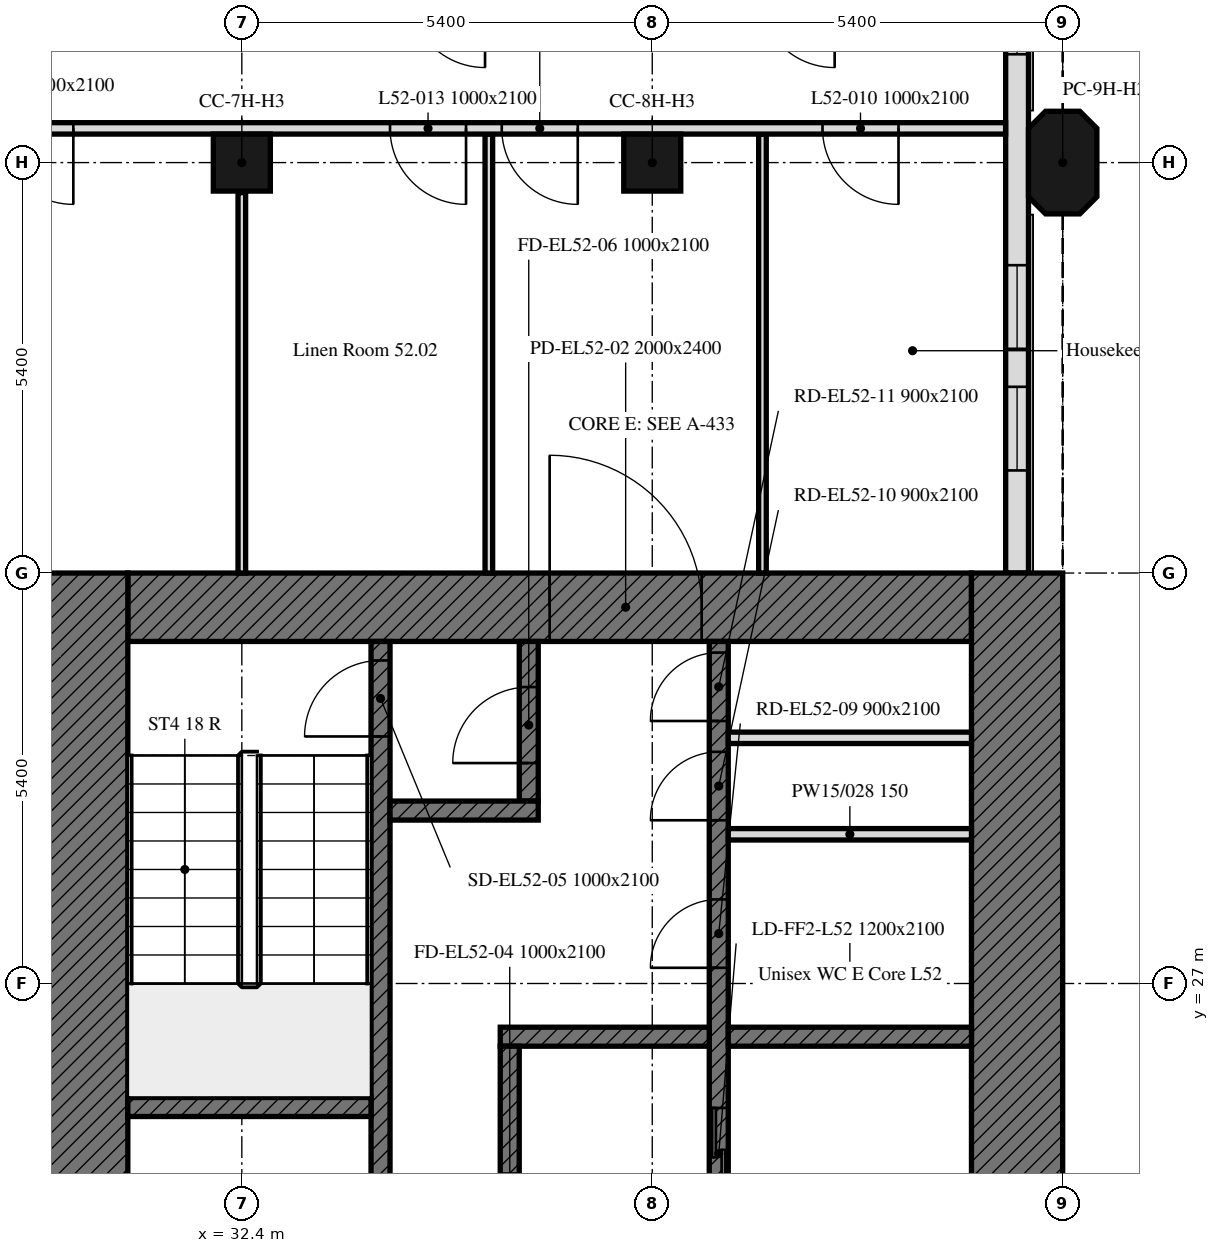
"""IFC4 building model, lengths in metres.
Left out: names, types, materials, properties, quantities, classifications, styles, units other than length and angle.
Written with IfcOpenShell. Run it as: python <this file> out.ifc"""

import sys

from ifc_helpers import new_model, si_unit, direction, frame, frame_2d, origin, origin_2d, place, context, subcontext, project, spatial, polyline, rectangle, outline, extrude, element, fill, save


model = new_model("IFC4")
c1 = context("Model", 3, precision=1e-05, world=origin(), true_north=direction((0.0, 1.0)))
c2 = subcontext(c1, "Body", "Model", "MODEL_VIEW")
j1 = project(units=[si_unit("LENGTHUNIT", "METRE"), si_unit("PLANEANGLEUNIT", "RADIAN")], contexts=[c1])
p1 = place(None, origin())
s1 = spatial("IfcSite", under=j1, at=p1, CompositionType="ELEMENT")
p2 = place(p1, origin())
s2 = spatial("IfcBuilding", under=s1, at=p2, CompositionType="ELEMENT")
p3 = place(p2, frame((0.0, 0.0, 210.4)))
s3 = spatial("IfcBuildingStorey", under=s2, at=p3, CompositionType="ELEMENT", Elevation=210.4)
for number, where, z_axis, x_axis in (
    (1, (32.4, 37.8, 0.0), (0.0, 0.0, 1.0), (1.0, 0.0, 0.0)),
    (2, (37.8, 37.8, 0.0), (0.0, 0.0, 1.0), (1.0, 0.0, 0.0)),
):
    element("IfcColumn", number, at=place(p3, frame(where, z_axis=z_axis, x_axis=x_axis)), inside=s3, PredefinedType="COLUMN", context=c2, shape_type="SweptSolid", body=[
        extrude(rectangle(XDim=0.75, YDim=0.75, at=origin_2d()), origin(), (0.0, 0.0, 1.0), 3.0),
    ])
p4 = place(p3, frame((43.2, 37.8, 0.0), z_axis=(0.0, 0.0, 1.0), x_axis=(0.0, 1.0, 0.0)))
e3 = element("IfcColumn", 3, at=p4, inside=s3, PredefinedType="COLUMN", context=c2, shape_type="SweptSolid", body=[
    extrude(outline(polyline([(-0.45, -0.45), (0.45, -0.45), (0.675, -0.225), (0.675, 0.225), (0.45, 0.45), (-0.45, 0.45), (-0.675, 0.225), (-0.675, -0.225), (-0.45, -0.45)])), origin(), (0.0, 0.0, 1.0), 3.0),
])
p5 = place(p3, frame((42.6, 32.4, 0.0), z_axis=(0.0, 0.0, 1.0), x_axis=(0.0, 1.0, 0.0)))
e4 = element("IfcWall", 4, at=p5, inside=s3, PredefinedType="SOLIDWALL", context=c2, shape_type="SweptSolid", body=[
    extrude(rectangle(XDim=10.614, YDim=0.3, at=frame_2d((5.307, 0.0))), origin(), (0.0, 0.0, 1.0), 3.0),
])
p6 = place(p5, frame((1.35, 0.0, 0.9)))
e5 = element("IfcOpeningElement", 5, at=p6, cuts=e4, PredefinedType="OPENING", context=c2, shape_type="SweptSolid", body=[
    extrude(rectangle(XDim=1.1, YDim=1.7, at=frame_2d((0.55, 0.85))), frame((0.0, 0.16, 0.0), z_axis=(0.0, -1.0, 0.0), x_axis=(1.0, 0.0, 0.0)), (0.0, 0.0, 1.0), 0.32),
])
p7 = place(p5, frame((2.95, 0.0, 0.9)))
e6 = element("IfcOpeningElement", 6, at=p7, cuts=e4, PredefinedType="OPENING", context=c2, shape_type="SweptSolid", body=[
    extrude(rectangle(XDim=1.1, YDim=1.7, at=frame_2d((0.55, 0.85))), frame((0.0, 0.16, 0.0), z_axis=(0.0, -1.0, 0.0), x_axis=(1.0, 0.0, 0.0)), (0.0, 0.0, 1.0), 0.32),
])
p8 = place(p5, frame((6.825, 0.0, 0.9)))
e7 = element("IfcOpeningElement", 7, at=p8, cuts=e4, PredefinedType="OPENING", context=c2, shape_type="SweptSolid", body=[
    extrude(rectangle(XDim=0.65, YDim=1.7, at=frame_2d((0.325, 0.85))), frame((0.0, 0.16, 0.0), z_axis=(0.0, -1.0, 0.0), x_axis=(1.0, 0.0, 0.0)), (0.0, 0.0, 1.0), 0.32),
])
p9 = place(p5, frame((8.35, 0.0, 0.9)))
e8 = element("IfcOpeningElement", 8, at=p9, cuts=e4, PredefinedType="OPENING", context=c2, shape_type="SweptSolid", body=[
    extrude(rectangle(XDim=1.1, YDim=1.7, at=frame_2d((0.55, 0.85))), frame((0.0, 0.16, 0.0), z_axis=(0.0, -1.0, 0.0), x_axis=(1.0, 0.0, 0.0)), (0.0, 0.0, 1.0), 0.32),
])
p10 = place(p3, frame((30.9, 31.95, 0.0), z_axis=(0.0, 0.0, 1.0), x_axis=(1.0, 0.0, 0.0)))
e9 = element("IfcWall", 9, at=p10, inside=s3, PredefinedType="SOLIDWALL", context=c2, shape_type="SweptSolid", body=[
    extrude(rectangle(XDim=11.1, YDim=0.9, at=frame_2d((5.55, 0.0))), origin(), (0.0, 0.0, 1.0), 3.0),
])
p11 = place(p10, frame((5.55, 0.0, 0.0)))
e10 = element("IfcOpeningElement", 10, at=p11, cuts=e9, PredefinedType="OPENING", context=c2, shape_type="SweptSolid", body=[
    extrude(rectangle(XDim=2.0, YDim=2.4, at=frame_2d((1.0, 1.2))), frame((0.0, 0.45, 0.0), z_axis=(0.0, -1.0, 0.0), x_axis=(1.0, 0.0, 0.0)), (0.0, 0.0, 1.0), 0.9),
])
for number, where, z_axis, x_axis in (
    (11, (42.6, 32.4, 0.0), (0.0, 0.0, 1.0), (0.0, -1.0, 0.0)),
    (12, (30.3, 16.2, 0.0), (0.0, 0.0, 1.0), (0.0, 1.0, 0.0)),
):
    element("IfcWall", number, at=place(p3, frame(where, z_axis=z_axis, x_axis=x_axis)), inside=s3, PredefinedType="SOLIDWALL", context=c2, shape_type="SweptSolid", body=[
        extrude(rectangle(XDim=16.2, YDim=1.2, at=frame_2d((8.1, 0.0))), origin(), (0.0, 0.0, 1.0), 3.0),
    ])
p12 = place(p3, frame((38.675, 17.1, 0.0), z_axis=(0.0, 0.0, 1.0), x_axis=(0.0, 1.0, 0.0)))
e13 = element("IfcWall", 13, at=p12, inside=s3, PredefinedType="SOLIDWALL", context=c2, shape_type="SweptSolid", body=[
    extrude(rectangle(XDim=14.4, YDim=0.25, at=frame_2d((7.2, 0.0))), origin(), (0.0, 0.0, 1.0), 3.0),
])
p13 = place(p12, frame((4.6, 0.0, 0.0)))
e14 = element("IfcOpeningElement", 14, at=p13, cuts=e13, PredefinedType="OPENING", context=c2, shape_type="SweptSolid", body=[
    extrude(rectangle(XDim=1.0, YDim=2.1, at=frame_2d((0.5, 1.05))), frame((0.0, 0.125, 0.0), z_axis=(0.0, -1.0, 0.0), x_axis=(1.0, 0.0, 0.0)), (0.0, 0.0, 1.0), 0.25),
])
p14 = place(p12, frame((7.062, 0.0, 0.0)))
e15 = element("IfcOpeningElement", 15, at=p14, cuts=e13, PredefinedType="OPENING", context=c2, shape_type="SweptSolid", body=[
    extrude(rectangle(XDim=1.2, YDim=2.1, at=frame_2d((0.6, 1.05))), frame((0.0, 0.125, 0.0), z_axis=(0.0, -1.0, 0.0), x_axis=(1.0, 0.0, 0.0)), (0.0, 0.0, 1.0), 0.25),
])
p15 = place(p12, frame((10.106, 0.0, 0.0)))
e16 = element("IfcOpeningElement", 16, at=p15, cuts=e13, PredefinedType="OPENING", context=c2, shape_type="SweptSolid", body=[
    extrude(rectangle(XDim=0.9, YDim=2.1, at=frame_2d((0.45, 1.05))), frame((0.0, 0.125, 0.0), z_axis=(0.0, -1.0, 0.0), x_axis=(1.0, 0.0, 0.0)), (0.0, 0.0, 1.0), 0.25),
])
p16 = place(p12, frame((12.048, 0.0, 0.0)))
e17 = element("IfcOpeningElement", 17, at=p16, cuts=e13, PredefinedType="OPENING", context=c2, shape_type="SweptSolid", body=[
    extrude(rectangle(XDim=0.9, YDim=2.1, at=frame_2d((0.45, 1.05))), frame((0.0, 0.125, 0.0), z_axis=(0.0, -1.0, 0.0), x_axis=(1.0, 0.0, 0.0)), (0.0, 0.0, 1.0), 0.25),
])
p17 = place(p12, frame((13.354, 0.0, 0.0)))
e18 = element("IfcOpeningElement", 18, at=p17, cuts=e13, PredefinedType="OPENING", context=c2, shape_type="SweptSolid", body=[
    extrude(rectangle(XDim=0.9, YDim=2.1, at=frame_2d((0.45, 1.05))), frame((0.0, 0.125, 0.0), z_axis=(0.0, -1.0, 0.0), x_axis=(1.0, 0.0, 0.0)), (0.0, 0.0, 1.0), 0.25),
])
p18 = place(p3, frame((34.225, 17.1, 0.0), z_axis=(0.0, 0.0, 1.0), x_axis=(0.0, 1.0, 0.0)))
e19 = element("IfcWall", 19, at=p18, inside=s3, PredefinedType="SOLIDWALL", context=c2, shape_type="SweptSolid", body=[
    extrude(rectangle(XDim=14.4, YDim=0.25, at=frame_2d((7.2, 0.0))), origin(), (0.0, 0.0, 1.0), 3.0),
])
p19 = place(p18, frame((13.15, 0.0, 0.0)))
e20 = element("IfcOpeningElement", 20, at=p19, cuts=e19, PredefinedType="OPENING", context=c2, shape_type="SweptSolid", body=[
    extrude(rectangle(XDim=1.0, YDim=2.1, at=frame_2d((0.5, 1.05))), frame((0.0, 0.125, 0.0), z_axis=(0.0, -1.0, 0.0), x_axis=(1.0, 0.0, 0.0)), (0.0, 0.0, 1.0), 0.25),
])
p20 = place(p18, frame((0.6, 0.0, 0.0)))
e21 = element("IfcOpeningElement", 21, at=p20, cuts=e19, PredefinedType="OPENING", context=c2, shape_type="SweptSolid", body=[
    extrude(rectangle(XDim=1.1, YDim=2.1, at=frame_2d((0.55, 1.05))), frame((0.0, 0.125, 0.0), z_axis=(0.0, -1.0, 0.0), x_axis=(1.0, 0.0, 0.0)), (0.0, 0.0, 1.0), 0.25),
])
p21 = place(p18, frame((3.25, 0.0, 0.0)))
e22 = element("IfcOpeningElement", 22, at=p21, cuts=e19, PredefinedType="OPENING", context=c2, shape_type="SweptSolid", body=[
    extrude(rectangle(XDim=0.9, YDim=2.1, at=frame_2d((0.45, 1.05))), frame((0.0, 0.125, 0.0), z_axis=(0.0, -1.0, 0.0), x_axis=(1.0, 0.0, 0.0)), (0.0, 0.0, 1.0), 0.25),
])
p22 = place(p3, frame((30.9, 25.375, 0.0), z_axis=(0.0, 0.0, 1.0), x_axis=(1.0, 0.0, 0.0)))
e23 = element("IfcWall", 23, at=p22, inside=s3, PredefinedType="SOLIDWALL", context=c2, shape_type="SweptSolid", body=[
    extrude(rectangle(XDim=3.2, YDim=0.25, at=frame_2d((1.6, 0.0))), origin(), (0.0, 0.0, 1.0), 3.0),
])
p23 = place(p3, frame((38.8, 26.3, 0.0), z_axis=(0.0, 0.0, 1.0), x_axis=(1.0, 0.0, 0.0)))
e24 = element("IfcWall", 24, at=p23, inside=s3, PredefinedType="SOLIDWALL", context=c2, shape_type="SweptSolid", body=[
    extrude(rectangle(XDim=3.2, YDim=0.25, at=frame_2d((1.6, 0.0))), origin(), (0.0, 0.0, 1.0), 3.0),
])
p24 = place(p3, frame((35.8, 26.3, 0.0), z_axis=(0.0, 0.0, 1.0), x_axis=(1.0, 0.0, 0.0)))
e25 = element("IfcWall", 25, at=p24, inside=s3, PredefinedType="SOLIDWALL", context=c2, shape_type="SweptSolid", body=[
    extrude(rectangle(XDim=2.75, YDim=0.25, at=frame_2d((1.375, 0.0))), origin(), (0.0, 0.0, 1.0), 3.0),
])
p25 = place(p3, frame((36.175, 29.4, 0.0), z_axis=(0.0, 0.0, 1.0), x_axis=(0.0, 1.0, 0.0)))
e26 = element("IfcWall", 26, at=p25, inside=s3, PredefinedType="SOLIDWALL", context=c2, shape_type="SweptSolid", body=[
    extrude(rectangle(XDim=2.1, YDim=0.25, at=frame_2d((1.05, 0.0))), origin(), (0.0, 0.0, 1.0), 3.0),
])
p26 = place(p25, frame((0.5, 0.0, 0.0)))
e27 = element("IfcOpeningElement", 27, at=p26, cuts=e26, PredefinedType="OPENING", context=c2, shape_type="SweptSolid", body=[
    extrude(rectangle(XDim=1.0, YDim=2.1, at=frame_2d((0.5, 1.05))), frame((0.0, 0.125, 0.0), z_axis=(0.0, -1.0, 0.0), x_axis=(1.0, 0.0, 0.0)), (0.0, 0.0, 1.0), 0.25),
])
p27 = place(p3, frame((34.35, 29.275, 0.0), z_axis=(0.0, 0.0, 1.0), x_axis=(1.0, 0.0, 0.0)))
e28 = element("IfcWall", 28, at=p27, inside=s3, PredefinedType="SOLIDWALL", context=c2, shape_type="SweptSolid", body=[
    extrude(rectangle(XDim=1.95, YDim=0.25, at=frame_2d((0.975, 0.0))), origin(), (0.0, 0.0, 1.0), 3.0),
])
p28 = place(p3, frame((35.925, 20.55, 0.0), z_axis=(0.0, 0.0, 1.0), x_axis=(0.0, 1.0, 0.0)))
e29 = element("IfcWall", 29, at=p28, inside=s3, PredefinedType="SOLIDWALL", context=c2, shape_type="SweptSolid", body=[
    extrude(rectangle(XDim=5.625, YDim=0.25, at=frame_2d((2.812, 0.0))), origin(), (0.0, 0.0, 1.0), 3.0),
])
p29 = place(p28, frame((2.95, 0.0, 0.0)))
e30 = element("IfcOpeningElement", 30, at=p29, cuts=e29, PredefinedType="OPENING", context=c2, shape_type="SweptSolid", body=[
    extrude(rectangle(XDim=1.0, YDim=2.1, at=frame_2d((0.5, 1.05))), frame((0.0, 0.125, 0.0), z_axis=(0.0, -1.0, 0.0), x_axis=(1.0, 0.0, 0.0)), (0.0, 0.0, 1.0), 0.25),
])
for number, where, z_axis, x_axis in (
    (31, (38.8, 28.963, 0.0), (0.0, 0.0, 1.0), (1.0, 0.0, 0.0)),
    (32, (38.8, 30.232, 0.0), (0.0, 0.0, 1.0), (1.0, 0.0, 0.0)),
):
    element("IfcWall", number, at=place(p3, frame(where, z_axis=z_axis, x_axis=x_axis)), inside=s3, PredefinedType="PARTITIONING", context=c2, shape_type="SweptSolid", body=[
        extrude(rectangle(XDim=3.2, YDim=0.15, at=frame_2d((1.6, 0.0))), origin(), (0.0, 0.0, 1.0), 3.0),
    ])
p30 = place(p3, frame((32.4, 32.4, 0.0), z_axis=(0.0, 0.0, 1.0), x_axis=(0.0, 1.0, 0.0)))
e33 = element("IfcWall", 33, at=p30, inside=s3, PredefinedType="PARTITIONING", context=c2, shape_type="SweptSolid", body=[
    extrude(rectangle(XDim=5.005, YDim=0.1, at=frame_2d((2.502, 0.0))), origin(), (0.0, 0.0, 1.0), 2.4),
])
for number, where, z_axis, x_axis in (
    (34, (39.25, 32.4, 0.0), (0.0, 0.0, 1.0), (0.0, 1.0, 0.0)),
    (35, (35.65, 38.175, 0.0), (0.0, 0.0, 1.0), (0.0, -1.0, 0.0)),
):
    element("IfcWall", number, at=place(p3, frame(where, z_axis=z_axis, x_axis=x_axis)), inside=s3, PredefinedType="PARTITIONING", context=c2, shape_type="SweptSolid", body=[
        extrude(rectangle(XDim=5.775, YDim=0.1, at=frame_2d((2.888, 0.0))), origin(), (0.0, 0.0, 1.0), 3.0),
    ])
p31 = place(p3, frame((42.449, 38.25, 0.0), z_axis=(0.0, 0.0, 1.0), x_axis=(-1.0, 0.0, 0.0)))
e36 = element("IfcWall", 36, at=p31, inside=s3, PredefinedType="PARTITIONING", context=c2, shape_type="SweptSolid", body=[
    extrude(rectangle(XDim=37.049, YDim=0.15, at=frame_2d((18.524, 0.0))), origin(), (0.0, 0.0, 1.0), 2.4),
])
p32 = place(p31, frame((12.266, 0.0, 0.0)))
e37 = element("IfcOpeningElement", 37, at=p32, cuts=e36, PredefinedType="OPENING", context=c2, shape_type="SweptSolid", body=[
    extrude(rectangle(XDim=1.0, YDim=2.1, at=frame_2d((0.5, 1.05))), frame((0.0, 0.075, 0.0), z_axis=(0.0, -1.0, 0.0), x_axis=(1.0, 0.0, 0.0)), (0.0, 0.0, 1.0), 0.15),
])
p33 = place(p31, frame((23.049, 0.0, 0.0)))
e38 = element("IfcOpeningElement", 38, at=p33, cuts=e36, PredefinedType="OPENING", context=c2, shape_type="SweptSolid", body=[
    extrude(rectangle(XDim=1.0, YDim=2.1, at=frame_2d((0.5, 1.05))), frame((0.0, 0.075, 0.0), z_axis=(0.0, -1.0, 0.0), x_axis=(1.0, 0.0, 0.0)), (0.0, 0.0, 1.0), 0.15),
])
p34 = place(p31, frame((1.409, 0.0, 0.0)))
e39 = element("IfcOpeningElement", 39, at=p34, cuts=e36, PredefinedType="OPENING", context=c2, shape_type="SweptSolid", body=[
    extrude(rectangle(XDim=1.0, YDim=2.1, at=frame_2d((0.5, 1.05))), frame((0.0, 0.075, 0.0), z_axis=(0.0, -1.0, 0.0), x_axis=(1.0, 0.0, 0.0)), (0.0, 0.0, 1.0), 0.15),
])
p35 = place(p31, frame((28.199, 0.0, 0.0)))
e40 = element("IfcOpeningElement", 40, at=p35, cuts=e36, PredefinedType="OPENING", context=c2, shape_type="SweptSolid", body=[
    extrude(rectangle(XDim=1.0, YDim=2.1, at=frame_2d((0.5, 1.05))), frame((0.0, 0.075, 0.0), z_axis=(0.0, -1.0, 0.0), x_axis=(1.0, 0.0, 0.0)), (0.0, 0.0, 1.0), 0.15),
])
p36 = place(p31, frame((7.099, 0.0, 0.0)))
e41 = element("IfcOpeningElement", 41, at=p36, cuts=e36, PredefinedType="OPENING", context=c2, shape_type="SweptSolid", body=[
    extrude(rectangle(XDim=1.0, YDim=2.1, at=frame_2d((0.5, 1.05))), frame((0.0, 0.075, 0.0), z_axis=(0.0, -1.0, 0.0), x_axis=(1.0, 0.0, 0.0)), (0.0, 0.0, 1.0), 0.15),
])
p37 = place(p31, frame((5.629, 0.0, 0.0)))
e42 = element("IfcOpeningElement", 42, at=p37, cuts=e36, PredefinedType="OPENING", context=c2, shape_type="SweptSolid", body=[
    extrude(rectangle(XDim=1.0, YDim=2.1, at=frame_2d((0.5, 1.05))), frame((0.0, 0.075, 0.0), z_axis=(0.0, -1.0, 0.0), x_axis=(1.0, 0.0, 0.0)), (0.0, 0.0, 1.0), 0.15),
])
p38 = place(p31, frame((29.669, 0.0, 0.0)))
e43 = element("IfcOpeningElement", 43, at=p38, cuts=e36, PredefinedType="OPENING", context=c2, shape_type="SweptSolid", body=[
    extrude(rectangle(XDim=1.0, YDim=2.1, at=frame_2d((0.5, 1.05))), frame((0.0, 0.075, 0.0), z_axis=(0.0, -1.0, 0.0), x_axis=(1.0, 0.0, 0.0)), (0.0, 0.0, 1.0), 0.15),
])
p39 = place(p6, origin())
e44 = element("IfcWindow", 44, at=p39, inside=s3, PartitioningType="SINGLE_PANEL", PredefinedType="WINDOW", context=c2, shape_type="SweptSolid", body=[
    extrude(rectangle(XDim=1.1, YDim=1.7, at=frame_2d((0.55, 0.85))), frame((0.0, 0.03, 0.0), z_axis=(0.0, -1.0, 0.0), x_axis=(1.0, 0.0, 0.0)), (0.0, 0.0, 1.0), 0.06),
])
fill(e5, e44)
p40 = place(p7, origin())
e45 = element("IfcWindow", 45, at=p40, inside=s3, PartitioningType="SINGLE_PANEL", PredefinedType="WINDOW", context=c2, shape_type="SweptSolid", body=[
    extrude(rectangle(XDim=1.1, YDim=1.7, at=frame_2d((0.55, 0.85))), frame((0.0, 0.03, 0.0), z_axis=(0.0, -1.0, 0.0), x_axis=(1.0, 0.0, 0.0)), (0.0, 0.0, 1.0), 0.06),
])
fill(e6, e45)
p41 = place(p8, origin())
e46 = element("IfcWindow", 46, at=p41, inside=s3, PartitioningType="SINGLE_PANEL", PredefinedType="WINDOW", context=c2, shape_type="SweptSolid", body=[
    extrude(rectangle(XDim=0.65, YDim=1.7, at=frame_2d((0.325, 0.85))), frame((0.0, 0.03, 0.0), z_axis=(0.0, -1.0, 0.0), x_axis=(1.0, 0.0, 0.0)), (0.0, 0.0, 1.0), 0.06),
])
fill(e7, e46)
p42 = place(p11, origin())
e47 = element("IfcDoor", 47, at=p42, inside=s3, OperationType="DOUBLE_DOOR_SINGLE_SWING", PredefinedType="DOOR", context=c2, shape_type="SweptSolid", body=[
    extrude(rectangle(XDim=2.0, YDim=2.4, at=frame_2d((1.0, 1.2))), frame((0.0, 0.025, 0.0), z_axis=(0.0, -1.0, 0.0), x_axis=(1.0, 0.0, 0.0)), (0.0, 0.0, 1.0), 0.05),
])
fill(e10, e47)
p43 = place(p19, origin())
e48 = element("IfcDoor", 48, at=p43, inside=s3, OperationType="SINGLE_SWING_LEFT", PredefinedType="DOOR", context=c2, shape_type="SweptSolid", body=[
    extrude(rectangle(XDim=1.0, YDim=2.1, at=frame_2d((0.5, 1.05))), frame((0.0, 0.025, 0.0), z_axis=(0.0, -1.0, 0.0), x_axis=(1.0, 0.0, 0.0)), (0.0, 0.0, 1.0), 0.05),
])
fill(e20, e48)
p44 = place(p26, origin())
e49 = element("IfcDoor", 49, at=p44, inside=s3, OperationType="SINGLE_SWING_LEFT", PredefinedType="DOOR", context=c2, shape_type="SweptSolid", body=[
    extrude(rectangle(XDim=1.0, YDim=2.1, at=frame_2d((0.5, 1.05))), frame((0.0, 0.025, 0.0), z_axis=(0.0, -1.0, 0.0), x_axis=(1.0, 0.0, 0.0)), (0.0, 0.0, 1.0), 0.05),
])
fill(e27, e49)
p45 = place(p14, origin())
e50 = element("IfcDoor", 50, at=p45, inside=s3, OperationType="DOUBLE_DOOR_SLIDING", PredefinedType="DOOR", context=c2, shape_type="SweptSolid", body=[
    extrude(rectangle(XDim=1.2, YDim=2.1, at=frame_2d((0.6, 1.05))), frame((0.0, 0.025, 0.0), z_axis=(0.0, -1.0, 0.0), x_axis=(1.0, 0.0, 0.0)), (0.0, 0.0, 1.0), 0.05),
])
fill(e15, e50)
p46 = place(p15, origin())
e51 = element("IfcDoor", 51, at=p46, inside=s3, OperationType="SINGLE_SWING_LEFT", PredefinedType="DOOR", context=c2, shape_type="SweptSolid", body=[
    extrude(rectangle(XDim=0.9, YDim=2.1, at=frame_2d((0.45, 1.05))), frame((0.0, 0.025, 0.0), z_axis=(0.0, -1.0, 0.0), x_axis=(1.0, 0.0, 0.0)), (0.0, 0.0, 1.0), 0.05),
])
fill(e16, e51)
p47 = place(p16, origin())
e52 = element("IfcDoor", 52, at=p47, inside=s3, OperationType="SINGLE_SWING_LEFT", PredefinedType="DOOR", context=c2, shape_type="SweptSolid", body=[
    extrude(rectangle(XDim=0.9, YDim=2.1, at=frame_2d((0.45, 1.05))), frame((0.0, 0.025, 0.0), z_axis=(0.0, -1.0, 0.0), x_axis=(1.0, 0.0, 0.0)), (0.0, 0.0, 1.0), 0.05),
])
fill(e17, e52)
p48 = place(p17, origin())
e53 = element("IfcDoor", 53, at=p48, inside=s3, OperationType="SINGLE_SWING_LEFT", PredefinedType="DOOR", context=c2, shape_type="SweptSolid", body=[
    extrude(rectangle(XDim=0.9, YDim=2.1, at=frame_2d((0.45, 1.05))), frame((0.0, 0.025, 0.0), z_axis=(0.0, -1.0, 0.0), x_axis=(1.0, 0.0, 0.0)), (0.0, 0.0, 1.0), 0.05),
])
fill(e18, e53)
p49 = place(p32, origin())
e54 = element("IfcDoor", 54, at=p49, inside=s3, OperationType="SINGLE_SWING_RIGHT", PredefinedType="DOOR", context=c2, shape_type="SweptSolid", body=[
    extrude(rectangle(XDim=1.0, YDim=2.1, at=frame_2d((0.5, 1.05))), frame((0.0, 0.025, 0.0), z_axis=(0.0, -1.0, 0.0), x_axis=(1.0, 0.0, 0.0)), (0.0, 0.0, 1.0), 0.05),
])
fill(e37, e54)
p50 = place(p34, origin())
e55 = element("IfcDoor", 55, at=p50, inside=s3, OperationType="SINGLE_SWING_LEFT", PredefinedType="DOOR", context=c2, shape_type="SweptSolid", body=[
    extrude(rectangle(XDim=1.0, YDim=2.1, at=frame_2d((0.5, 1.05))), frame((0.0, 0.025, 0.0), z_axis=(0.0, -1.0, 0.0), x_axis=(1.0, 0.0, 0.0)), (0.0, 0.0, 1.0), 0.05),
])
fill(e39, e55)
p51 = place(p36, origin())
e56 = element("IfcDoor", 56, at=p51, inside=s3, OperationType="SINGLE_SWING_RIGHT", PredefinedType="DOOR", context=c2, shape_type="SweptSolid", body=[
    extrude(rectangle(XDim=1.0, YDim=2.1, at=frame_2d((0.5, 1.05))), frame((0.0, 0.025, 0.0), z_axis=(0.0, -1.0, 0.0), x_axis=(1.0, 0.0, 0.0)), (0.0, 0.0, 1.0), 0.05),
])
fill(e41, e56)
p52 = place(p37, origin())
e57 = element("IfcDoor", 57, at=p52, inside=s3, OperationType="SINGLE_SWING_RIGHT", PredefinedType="DOOR", context=c2, shape_type="SweptSolid", body=[
    extrude(rectangle(XDim=1.0, YDim=2.1, at=frame_2d((0.5, 1.05))), frame((0.0, 0.025, 0.0), z_axis=(0.0, -1.0, 0.0), x_axis=(1.0, 0.0, 0.0)), (0.0, 0.0, 1.0), 0.05),
])
fill(e42, e57)
save(model, sys.argv[1])
